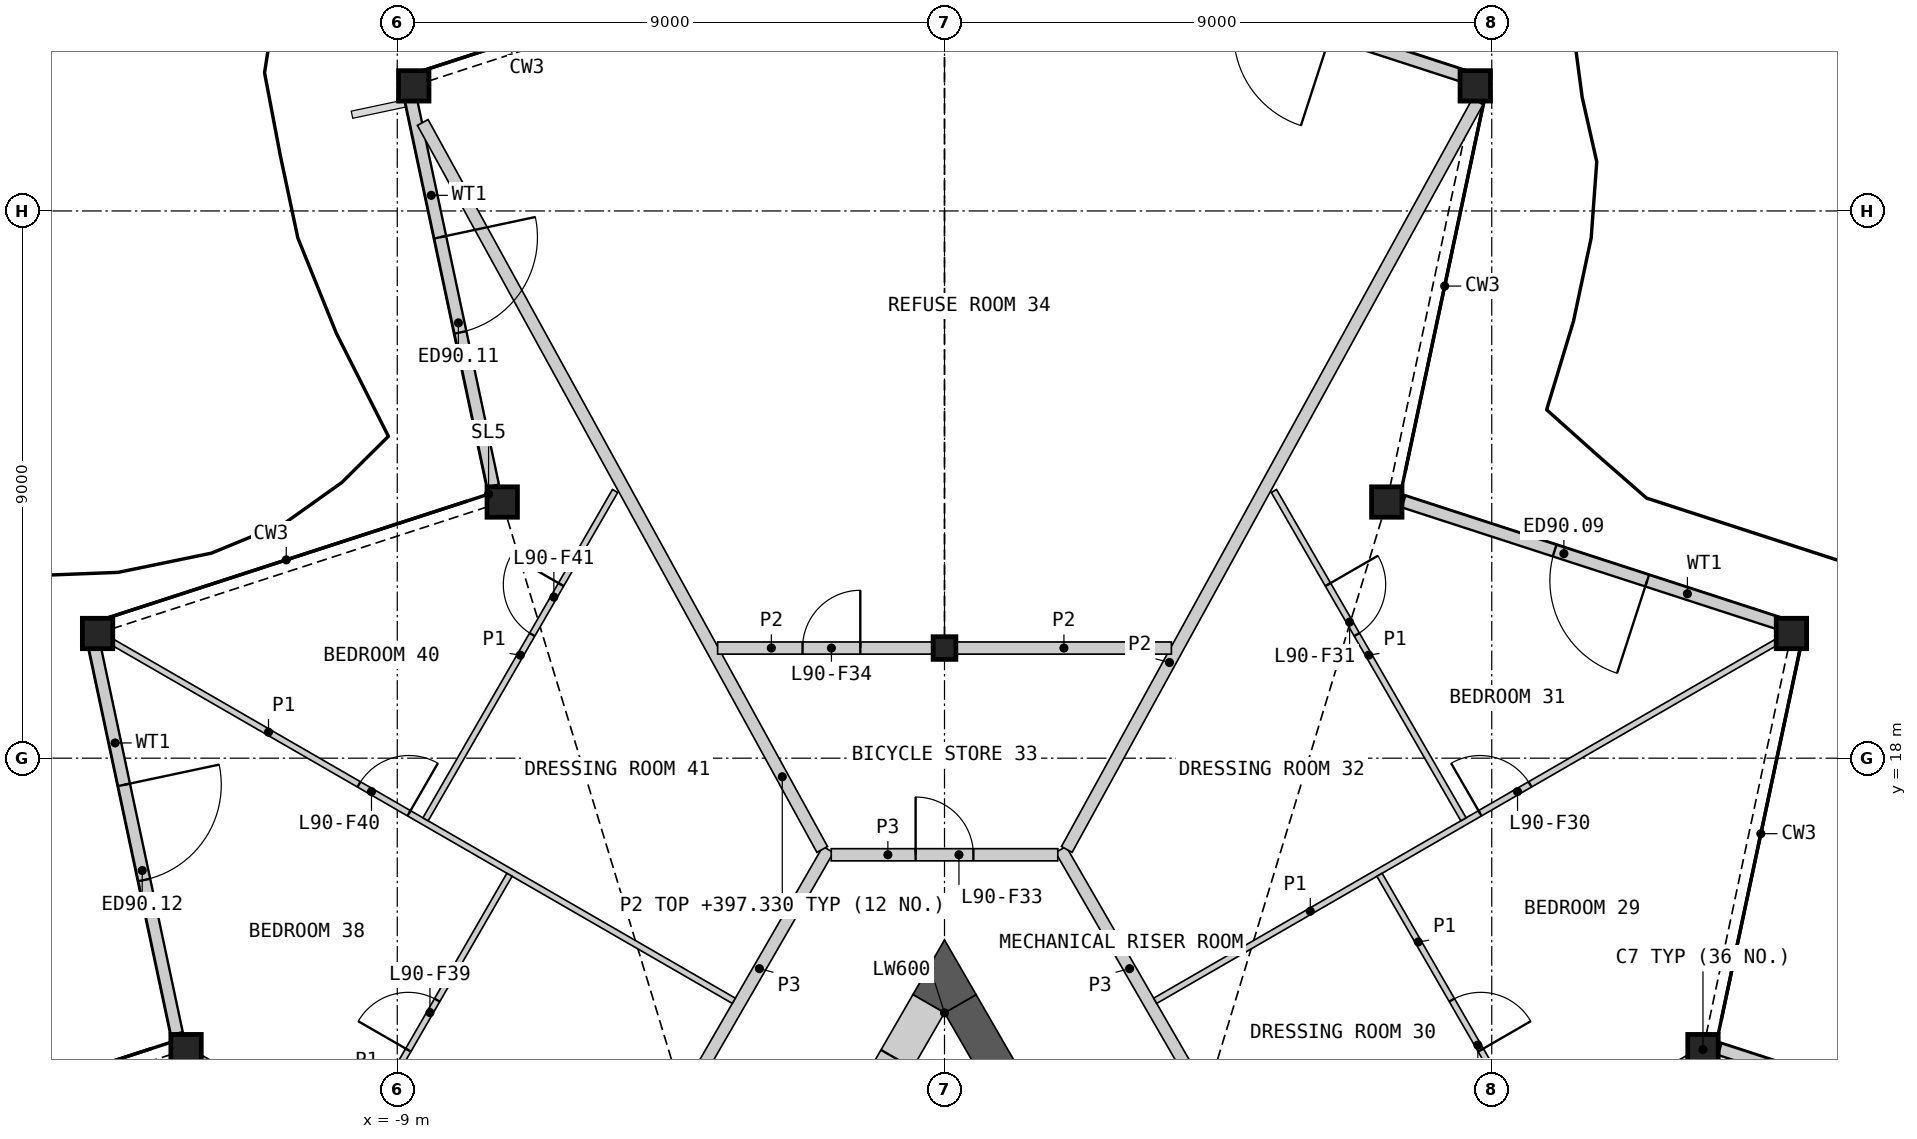
"""IFC4 building model, lengths in metres.
Left out: names, types, materials, properties, quantities, classifications, styles, units other than length and angle.
Written with IfcOpenShell. Run it as: python <this file> out.ifc"""

import sys

from ifc_helpers import new_model, si_unit, direction, frame, frame_2d, origin, origin_2d, place, context, subcontext, project, spatial, polyline, rectangle, hollow_rectangle, i_section, outline, extrude, element, fill, save


model = new_model("IFC4")
c1 = context("Model", 3, precision=1e-05, world=origin(), true_north=direction((0.0, 1.0)))
c2 = subcontext(c1, "Body", "Model", "MODEL_VIEW")
j1 = project(units=[si_unit("LENGTHUNIT", "METRE"), si_unit("PLANEANGLEUNIT", "RADIAN")], contexts=[c1])
p1 = place(None, origin())
s1 = spatial("IfcSite", under=j1, at=p1, CompositionType="ELEMENT")
p2 = place(p1, origin())
s2 = spatial("IfcBuilding", under=s1, at=p2, CompositionType="ELEMENT")
p3 = place(p2, frame((0.0, 0.0, 395.0)))
s3 = spatial("IfcBuildingStorey", under=s2, at=p3, CompositionType="ELEMENT", Elevation=395.0)
for number, where, z_axis, x_axis in (
    (1, (12.474, 13.206, 0.0), (0.0, 0.0, 1.0), (1.0, 0.0, 0.0)),
    (2, (13.929, 20.051, 0.0), (0.0, 0.0, 1.0), (1.0, 0.0, 0.0)),
    (3, (7.274, 22.213, 0.0), (0.0, 0.0, 1.0), (1.0, 0.0, 0.0)),
    (4, (8.729, 29.057, 0.0), (0.0, 0.0, 1.0), (1.0, 0.0, 0.0)),
    (5, (-8.729, 29.057, 0.0), (0.0, 0.0, 1.0), (1.0, 0.0, 0.0)),
    (6, (-7.274, 22.213, 0.0), (0.0, 0.0, 1.0), (1.0, 0.0, 0.0)),
    (7, (-13.929, 20.051, 0.0), (0.0, 0.0, 1.0), (1.0, 0.0, 0.0)),
    (8, (-12.474, 13.206, 0.0), (0.0, 0.0, 1.0), (1.0, 0.0, 0.0)),
):
    element("IfcColumn", number, at=place(p3, frame(where, z_axis=z_axis, x_axis=x_axis)), inside=s3, PredefinedType="COLUMN", context=c2, shape_type="SweptSolid", body=[
        extrude(hollow_rectangle(XDim=0.5, YDim=0.5, WallThickness=0.03, at=origin_2d()), origin(), (0.0, 0.0, 1.0), 3.4),
    ])
p4 = place(p3, frame((0.0, 19.811, 0.0), z_axis=(0.0, 0.0, 1.0), x_axis=(1.0, 0.0, 0.0)))
e9 = element("IfcColumn", 9, at=p4, inside=s3, PredefinedType="COLUMN", context=c2, shape_type="SweptSolid", body=[
    extrude(i_section(OverallWidth=0.374, OverallDepth=0.372, WebThickness=0.016, FlangeThickness=0.026, at=origin_2d()), origin(), (0.0, 0.0, 1.0), 3.4),
])
p5 = place(p3, frame((18.974, 11.191, 0.0), z_axis=(0.0, 0.0, 1.0), x_axis=(-0.951057912068, 0.309012698595, 0.0)))
e10 = element("IfcWall", 10, at=p5, inside=s3, PredefinedType="SOLIDWALL", context=c2, shape_type="SweptSolid", body=[
    extrude(rectangle(XDim=6.546, YDim=0.2, at=frame_2d((3.273, 0.0))), origin(), (0.0, 0.0, 1.0), 2.634),
])
p6 = place(p5, frame((2.333, 0.0, 0.0)))
e11 = element("IfcOpeningElement", 11, at=p6, cuts=e10, PredefinedType="OPENING", context=c2, shape_type="SweptSolid", body=[
    extrude(rectangle(XDim=1.6, YDim=2.25, at=frame_2d((0.8, 1.125))), frame((0.0, 0.11, 0.0), z_axis=(0.0, -1.0, 0.0), x_axis=(1.0, 0.0, 0.0)), (0.0, 0.0, 1.0), 0.22),
])
p7 = place(p3, frame((13.774, 20.198, 0.0), z_axis=(0.0, 0.0, 1.0), x_axis=(-0.951046950169, 0.309046434335, 0.0)))
e12 = element("IfcWall", 12, at=p7, inside=s3, PredefinedType="SOLIDWALL", context=c2, shape_type="SweptSolid", body=[
    extrude(rectangle(XDim=6.546, YDim=0.2, at=frame_2d((3.273, 0.0))), origin(), (0.0, 0.0, 1.0), 2.634),
])
p8 = place(p7, frame((2.333, 0.0, 0.0)))
e13 = element("IfcOpeningElement", 13, at=p8, cuts=e12, PredefinedType="OPENING", context=c2, shape_type="SweptSolid", body=[
    extrude(rectangle(XDim=1.6, YDim=2.25, at=frame_2d((0.8, 1.125))), frame((0.0, 0.11, 0.0), z_axis=(0.0, -1.0, 0.0), x_axis=(1.0, 0.0, 0.0)), (0.0, 0.0, 1.0), 0.22),
])
p9 = place(p3, frame((8.574, 29.205, 0.0), z_axis=(0.0, 0.0, 1.0), x_axis=(-0.951057912068, 0.309012698595, 0.0)))
e14 = element("IfcWall", 14, at=p9, inside=s3, PredefinedType="SOLIDWALL", context=c2, shape_type="SweptSolid", body=[
    extrude(rectangle(XDim=6.546, YDim=0.2, at=frame_2d((3.273, 0.0))), origin(), (0.0, 0.0, 1.0), 2.634),
])
p10 = place(p9, frame((2.333, 0.0, 0.0)))
e15 = element("IfcOpeningElement", 15, at=p10, cuts=e14, PredefinedType="OPENING", context=c2, shape_type="SweptSolid", body=[
    extrude(rectangle(XDim=1.6, YDim=2.25, at=frame_2d((0.8, 1.125))), frame((0.0, 0.11, 0.0), z_axis=(0.0, -1.0, 0.0), x_axis=(1.0, 0.0, 0.0)), (0.0, 0.0, 1.0), 0.22),
])
p11 = place(p3, frame((-8.779, 28.85, 0.0), z_axis=(0.0, 0.0, 1.0), x_axis=(0.207910765171, -0.978147797486, 0.0)))
e16 = element("IfcWall", 16, at=p11, inside=s3, PredefinedType="SOLIDWALL", context=c2, shape_type="SweptSolid", body=[
    extrude(rectangle(XDim=6.512, YDim=0.2, at=frame_2d((3.256, 0.0))), origin(), (0.0, 0.0, 1.0), 2.634),
])
p12 = place(p11, frame((2.333, 0.0, 0.0)))
e17 = element("IfcOpeningElement", 17, at=p12, cuts=e16, PredefinedType="OPENING", context=c2, shape_type="SweptSolid", body=[
    extrude(rectangle(XDim=1.6, YDim=2.25, at=frame_2d((0.8, 1.125))), frame((0.0, 0.11, 0.0), z_axis=(0.0, -1.0, 0.0), x_axis=(1.0, 0.0, 0.0)), (0.0, 0.0, 1.0), 0.22),
])
p13 = place(p3, frame((-13.979, 19.843, 0.0), z_axis=(0.0, 0.0, 1.0), x_axis=(0.207910765171, -0.978147797486, 0.0)))
e18 = element("IfcWall", 18, at=p13, inside=s3, PredefinedType="SOLIDWALL", context=c2, shape_type="SweptSolid", body=[
    extrude(rectangle(XDim=6.512, YDim=0.2, at=frame_2d((3.256, 0.0))), origin(), (0.0, 0.0, 1.0), 2.634),
])
p14 = place(p13, frame((2.333, 0.0, 0.0)))
e19 = element("IfcOpeningElement", 19, at=p14, cuts=e18, PredefinedType="OPENING", context=c2, shape_type="SweptSolid", body=[
    extrude(rectangle(XDim=1.6, YDim=2.25, at=frame_2d((0.8, 1.125))), frame((0.0, 0.11, 0.0), z_axis=(0.0, -1.0, 0.0), x_axis=(1.0, 0.0, 0.0)), (0.0, 0.0, 1.0), 0.22),
])
p15 = place(p3, frame((2.361, 10.322, 0.0), z_axis=(0.0, 0.0, 1.0), x_axis=(-0.500000735859, 0.866024978935, 0.0)))
e20 = element("IfcWall", 20, at=p15, inside=s3, PredefinedType="SHEAR", context=c2, shape_type="SweptSolid", body=[
    extrude(rectangle(XDim=4.202, YDim=0.6, at=frame_2d((2.101, 0.0))), origin(), (0.0, 0.0, 1.0), 3.1),
])
p16 = place(p3, origin())
e21 = element("IfcWall", 21, at=p16, inside=s3, PredefinedType="SHEAR", context=c2, shape_type="SweptSolid", body=[
    extrude(outline(polyline([(0.0, 13.811), (-0.52, 14.111), (0.0, 15.011), (0.52, 14.111), (0.0, 13.811)])), origin(), (0.0, 0.0, 1.0), 3.1),
])
p17 = place(p3, frame((-0.26, 13.961, 0.0), z_axis=(0.0, 0.0, 1.0), x_axis=(-0.49997936161, -0.866037319036, 0.0)))
e22 = element("IfcWall", 22, at=p17, inside=s3, PredefinedType="SHEAR", context=c2, shape_type="SweptSolid", body=[
    extrude(rectangle(XDim=2.66, YDim=0.6, at=frame_2d((1.33, 0.0))), origin(), (0.0, 0.0, 1.0), 3.1),
])
p18 = place(p17, frame((1.05, 0.0, 0.0)))
e23 = element("IfcOpeningElement", 23, at=p18, cuts=e22, PredefinedType="OPENING", context=c2, shape_type="SweptSolid", body=[
    extrude(rectangle(XDim=1.0, YDim=2.1, at=frame_2d((0.5, 1.05))), frame((0.0, 0.31, 0.0), z_axis=(0.0, -1.0, 0.0), x_axis=(1.0, 0.0, 0.0)), (0.0, 0.0, 1.0), 0.62),
])
for number, where, z_axis, x_axis in (
    (24, (-4.176, 12.579, 0.0), (0.0, 0.0, 1.0), (0.5, 0.866, 0.0)),
    (25, (1.913, 16.498, 0.0), (0.0, 0.0, 1.0), (0.5, -0.866, 0.0)),
):
    element("IfcWall", number, at=place(p3, frame(where, z_axis=z_axis, x_axis=x_axis)), inside=s3, PredefinedType="PARTITIONING", context=c2, shape_type="SweptSolid", body=[
        extrude(rectangle(XDim=4.525, YDim=0.2, at=frame_2d((2.263, 0.0))), origin(), (0.0, 0.0, 1.0), 3.1),
    ])
p19 = place(p3, frame((-1.863, 16.411, 0.0), z_axis=(0.0, 0.0, 1.0), x_axis=(1.0, 0.0, 0.0)))
e26 = element("IfcWall", 26, at=p19, inside=s3, PredefinedType="PARTITIONING", context=c2, shape_type="SweptSolid", body=[
    extrude(rectangle(XDim=3.726, YDim=0.2, at=frame_2d((1.863, 0.0))), origin(), (0.0, 0.0, 1.0), 3.1),
])
p20 = place(p19, frame((1.388, 0.0, 0.0)))
e27 = element("IfcOpeningElement", 27, at=p20, cuts=e26, PredefinedType="OPENING", context=c2, shape_type="SweptSolid", body=[
    extrude(rectangle(XDim=0.95, YDim=2.1, at=frame_2d((0.475, 1.05))), frame((0.0, 0.11, 0.0), z_axis=(0.0, -1.0, 0.0), x_axis=(1.0, 0.0, 0.0)), (0.0, 0.0, 1.0), 0.22),
])
p21 = place(p3, frame((-8.581, 28.455, 0.0), z_axis=(0.0, 0.0, 1.0), x_axis=(0.481551865547, -0.876417594979, 0.0)))
e28 = element("IfcWall", 28, at=p21, inside=s3, PredefinedType="PARTITIONING", context=c2, shape_type="SweptSolid", body=[
    extrude(rectangle(XDim=13.643, YDim=0.2, at=frame_2d((6.821, 0.0))), origin(), (0.0, 0.0, 1.0), 2.33),
])
p22 = place(p3, frame((2.011, 16.499, 0.0), z_axis=(0.0, 0.0, 1.0), x_axis=(0.481548701843, 0.876419333284, 0.0)))
e29 = element("IfcWall", 29, at=p22, inside=s3, PredefinedType="PARTITIONING", context=c2, shape_type="SweptSolid", body=[
    extrude(rectangle(XDim=14.032, YDim=0.2, at=frame_2d((7.016, 0.0))), origin(), (0.0, 0.0, 1.0), 2.33),
])
p23 = place(p3, frame((0.197, 19.811, 0.0), z_axis=(0.0, 0.0, 1.0), x_axis=(1.0, 0.0, 0.0)))
e30 = element("IfcWall", 30, at=p23, inside=s3, PredefinedType="PARTITIONING", context=c2, shape_type="SweptSolid", body=[
    extrude(rectangle(XDim=3.534, YDim=0.2, at=frame_2d((1.767, 0.0))), origin(), (0.0, 0.0, 1.0), 2.33),
])
p24 = place(p3, frame((-3.731, 19.811, 0.0), z_axis=(0.0, 0.0, 1.0), x_axis=(1.0, 0.0, 0.0)))
e31 = element("IfcWall", 31, at=p24, inside=s3, PredefinedType="PARTITIONING", context=c2, shape_type="SweptSolid", body=[
    extrude(rectangle(XDim=3.534, YDim=0.2, at=frame_2d((1.767, 0.0))), origin(), (0.0, 0.0, 1.0), 2.33),
])
p25 = place(p24, frame((1.396, 0.0, 0.0)))
e32 = element("IfcOpeningElement", 32, at=p25, cuts=e31, PredefinedType="OPENING", context=c2, shape_type="SweptSolid", body=[
    extrude(rectangle(XDim=0.95, YDim=2.1, at=frame_2d((0.475, 1.05))), frame((0.0, 0.11, 0.0), z_axis=(0.0, -1.0, 0.0), x_axis=(1.0, 0.0, 0.0)), (0.0, 0.0, 1.0), 0.22),
])
p26 = place(p3, frame((-13.669, 19.9, 0.0), z_axis=(0.0, 0.0, 1.0), x_axis=(0.866032376801, -0.499987922186, 0.0)))
e33 = element("IfcWall", 33, at=p26, inside=s3, PredefinedType="PARTITIONING", context=c2, shape_type="SweptSolid", body=[
    extrude(rectangle(XDim=11.782, YDim=0.1, at=frame_2d((5.891, 0.0))), origin(), (0.0, 0.0, 1.0), 2.33),
])
p27 = place(p26, frame((4.664, 0.0, 0.0)))
e34 = element("IfcOpeningElement", 34, at=p27, cuts=e33, PredefinedType="OPENING", context=c2, shape_type="SweptSolid", body=[
    extrude(rectangle(XDim=0.95, YDim=2.1, at=frame_2d((0.475, 1.05))), frame((0.0, 0.06, 0.0), z_axis=(0.0, -1.0, 0.0), x_axis=(1.0, 0.0, 0.0)), (0.0, 0.0, 1.0), 0.12),
])
p28 = place(p3, frame((3.465, 14.01, 0.0), z_axis=(0.0, 0.0, 1.0), x_axis=(0.866032376801, 0.499987922186, 0.0)))
e35 = element("IfcWall", 35, at=p28, inside=s3, PredefinedType="PARTITIONING", context=c2, shape_type="SweptSolid", body=[
    extrude(rectangle(XDim=11.782, YDim=0.1, at=frame_2d((5.891, 0.0))), origin(), (0.0, 0.0, 1.0), 2.33),
])
p29 = place(p28, frame((6.168, 0.0, 0.0)))
e36 = element("IfcOpeningElement", 36, at=p29, cuts=e35, PredefinedType="OPENING", context=c2, shape_type="SweptSolid", body=[
    extrude(rectangle(XDim=0.95, YDim=2.1, at=frame_2d((0.475, 1.05))), frame((0.0, 0.06, 0.0), z_axis=(0.0, -1.0, 0.0), x_axis=(1.0, 0.0, 0.0)), (0.0, 0.0, 1.0), 0.12),
])
p30 = place(p3, frame((6.065, 9.506, 0.0), z_axis=(0.0, 0.0, 1.0), x_axis=(0.866018949465, 0.500011179042, 0.0)))
e37 = element("IfcWall", 37, at=p30, inside=s3, PredefinedType="PARTITIONING", context=c2, shape_type="SweptSolid", body=[
    extrude(rectangle(XDim=7.1, YDim=0.1, at=frame_2d((3.55, 0.0))), origin(), (0.0, 0.0, 1.0), 2.33),
])
p31 = place(p30, frame((4.488, 0.0, 0.0)))
e38 = element("IfcOpeningElement", 38, at=p31, cuts=e37, PredefinedType="OPENING", context=c2, shape_type="SweptSolid", body=[
    extrude(rectangle(XDim=0.95, YDim=2.1, at=frame_2d((0.475, 1.05))), frame((0.0, 0.06, 0.0), z_axis=(0.0, -1.0, 0.0), x_axis=(1.0, 0.0, 0.0)), (0.0, 0.0, 1.0), 0.12),
])
p32 = place(p3, frame((-12.214, 13.056, 0.0), z_axis=(0.0, 0.0, 1.0), x_axis=(0.866018949465, -0.500011179042, 0.0)))
e39 = element("IfcWall", 39, at=p32, inside=s3, PredefinedType="PARTITIONING", context=c2, shape_type="SweptSolid", body=[
    extrude(rectangle(XDim=7.1, YDim=0.1, at=frame_2d((3.55, 0.0))), origin(), (0.0, 0.0, 1.0), 2.33),
])
p33 = place(p32, frame((1.663, 0.0, 0.0)))
e40 = element("IfcOpeningElement", 40, at=p33, cuts=e39, PredefinedType="OPENING", context=c2, shape_type="SweptSolid", body=[
    extrude(rectangle(XDim=0.95, YDim=2.1, at=frame_2d((0.475, 1.05))), frame((0.0, 0.06, 0.0), z_axis=(0.0, -1.0, 0.0), x_axis=(1.0, 0.0, 0.0)), (0.0, 0.0, 1.0), 0.12),
])
p34 = place(p3, frame((5.417, 22.394, 0.0), z_axis=(0.0, 0.0, 1.0), x_axis=(0.499975529996, -0.866039531087, 0.0)))
e41 = element("IfcWall", 41, at=p34, inside=s3, PredefinedType="PARTITIONING", context=c2, shape_type="SweptSolid", body=[
    extrude(rectangle(XDim=6.235, YDim=0.1, at=frame_2d((3.118, 0.0))), origin(), (0.0, 0.0, 1.0), 2.33),
])
p35 = place(p34, frame((1.777, 0.0, 0.0)))
e42 = element("IfcOpeningElement", 42, at=p35, cuts=e41, PredefinedType="OPENING", context=c2, shape_type="SweptSolid", body=[
    extrude(rectangle(XDim=0.95, YDim=2.1, at=frame_2d((0.475, 1.05))), frame((0.0, 0.06, 0.0), z_axis=(0.0, -1.0, 0.0), x_axis=(1.0, 0.0, 0.0)), (0.0, 0.0, 1.0), 0.12),
])
p36 = place(p3, frame((-8.535, 16.994, 0.0), z_axis=(0.0, 0.0, 1.0), x_axis=(0.499975529996, 0.866039531087, 0.0)))
e43 = element("IfcWall", 43, at=p36, inside=s3, PredefinedType="PARTITIONING", context=c2, shape_type="SweptSolid", body=[
    extrude(rectangle(XDim=6.235, YDim=0.1, at=frame_2d((3.118, 0.0))), origin(), (0.0, 0.0, 1.0), 2.33),
])
p37 = place(p36, frame((3.508, 0.0, 0.0)))
e44 = element("IfcOpeningElement", 44, at=p37, cuts=e43, PredefinedType="OPENING", context=c2, shape_type="SweptSolid", body=[
    extrude(rectangle(XDim=0.95, YDim=2.1, at=frame_2d((0.475, 1.05))), frame((0.0, 0.06, 0.0), z_axis=(0.0, -1.0, 0.0), x_axis=(1.0, 0.0, 0.0)), (0.0, 0.0, 1.0), 0.12),
])
p38 = place(p3, frame((7.154, 16.082, 0.0), z_axis=(0.0, 0.0, 1.0), x_axis=(0.499984882974, -0.866034131428, 0.0)))
e45 = element("IfcWall", 45, at=p38, inside=s3, PredefinedType="PARTITIONING", context=c2, shape_type="SweptSolid", body=[
    extrude(rectangle(XDim=5.1, YDim=0.1, at=frame_2d((2.55, 0.0))), origin(), (0.0, 0.0, 1.0), 2.33),
])
p39 = place(p38, frame((2.379, 0.0, 0.0)))
e46 = element("IfcOpeningElement", 46, at=p39, cuts=e45, PredefinedType="OPENING", context=c2, shape_type="SweptSolid", body=[
    extrude(rectangle(XDim=0.95, YDim=2.1, at=frame_2d((0.475, 1.05))), frame((0.0, 0.06, 0.0), z_axis=(0.0, -1.0, 0.0), x_axis=(1.0, 0.0, 0.0)), (0.0, 0.0, 1.0), 0.12),
])
p40 = place(p3, frame((-9.704, 11.665, 0.0), z_axis=(0.0, 0.0, 1.0), x_axis=(0.499984882974, 0.866034131428, 0.0)))
e47 = element("IfcWall", 47, at=p40, inside=s3, PredefinedType="PARTITIONING", context=c2, shape_type="SweptSolid", body=[
    extrude(rectangle(XDim=5.1, YDim=0.1, at=frame_2d((2.55, 0.0))), origin(), (0.0, 0.0, 1.0), 2.33),
])
p41 = place(p40, frame((1.771, 0.0, 0.0)))
e48 = element("IfcOpeningElement", 48, at=p41, cuts=e47, PredefinedType="OPENING", context=c2, shape_type="SweptSolid", body=[
    extrude(rectangle(XDim=0.95, YDim=2.1, at=frame_2d((0.475, 1.05))), frame((0.0, 0.06, 0.0), z_axis=(0.0, -1.0, 0.0), x_axis=(1.0, 0.0, 0.0)), (0.0, 0.0, 1.0), 0.12),
])
p42 = place(p8, origin())
e49 = element("IfcDoor", 49, at=p42, inside=s3, OperationType="DOUBLE_DOOR_SINGLE_SWING", PredefinedType="DOOR", context=c2, shape_type="SweptSolid", body=[
    extrude(rectangle(XDim=1.6, YDim=2.25, at=frame_2d((0.8, 1.125))), frame((0.0, 0.025, 0.0), z_axis=(0.0, -1.0, 0.0), x_axis=(1.0, 0.0, 0.0)), (0.0, 0.0, 1.0), 0.05),
])
fill(e13, e49)
p43 = place(p12, origin())
e50 = element("IfcDoor", 50, at=p43, inside=s3, OperationType="DOUBLE_DOOR_SINGLE_SWING", PredefinedType="DOOR", context=c2, shape_type="SweptSolid", body=[
    extrude(rectangle(XDim=1.6, YDim=2.25, at=frame_2d((0.8, 1.125))), frame((0.0, 0.025, 0.0), z_axis=(0.0, -1.0, 0.0), x_axis=(1.0, 0.0, 0.0)), (0.0, 0.0, 1.0), 0.05),
])
fill(e17, e50)
p44 = place(p14, origin())
e51 = element("IfcDoor", 51, at=p44, inside=s3, OperationType="DOUBLE_DOOR_SINGLE_SWING", PredefinedType="DOOR", context=c2, shape_type="SweptSolid", body=[
    extrude(rectangle(XDim=1.6, YDim=2.25, at=frame_2d((0.8, 1.125))), frame((0.0, 0.025, 0.0), z_axis=(0.0, -1.0, 0.0), x_axis=(1.0, 0.0, 0.0)), (0.0, 0.0, 1.0), 0.05),
])
fill(e19, e51)
p45 = place(p39, origin())
e52 = element("IfcDoor", 52, at=p45, inside=s3, OperationType="SINGLE_SWING_RIGHT", PredefinedType="DOOR", context=c2, shape_type="SweptSolid", body=[
    extrude(rectangle(XDim=0.95, YDim=2.1, at=frame_2d((0.475, 1.05))), frame((0.0, 0.025, 0.0), z_axis=(0.0, -1.0, 0.0), x_axis=(1.0, 0.0, 0.0)), (0.0, 0.0, 1.0), 0.05),
])
fill(e46, e52)
p46 = place(p29, origin())
e53 = element("IfcDoor", 53, at=p46, inside=s3, OperationType="SINGLE_SWING_LEFT", PredefinedType="DOOR", context=c2, shape_type="SweptSolid", body=[
    extrude(rectangle(XDim=0.95, YDim=2.1, at=frame_2d((0.475, 1.05))), frame((0.0, 0.025, 0.0), z_axis=(0.0, -1.0, 0.0), x_axis=(1.0, 0.0, 0.0)), (0.0, 0.0, 1.0), 0.05),
])
fill(e36, e53)
p47 = place(p35, origin())
e54 = element("IfcDoor", 54, at=p47, inside=s3, OperationType="SINGLE_SWING_LEFT", PredefinedType="DOOR", context=c2, shape_type="SweptSolid", body=[
    extrude(rectangle(XDim=0.95, YDim=2.1, at=frame_2d((0.475, 1.05))), frame((0.0, 0.025, 0.0), z_axis=(0.0, -1.0, 0.0), x_axis=(1.0, 0.0, 0.0)), (0.0, 0.0, 1.0), 0.05),
])
fill(e42, e54)
p48 = place(p20, origin())
e55 = element("IfcDoor", 55, at=p48, inside=s3, OperationType="SINGLE_SWING_LEFT", PredefinedType="DOOR", context=c2, shape_type="SweptSolid", body=[
    extrude(rectangle(XDim=0.95, YDim=2.1, at=frame_2d((0.475, 1.05))), frame((0.0, 0.025, 0.0), z_axis=(0.0, -1.0, 0.0), x_axis=(1.0, 0.0, 0.0)), (0.0, 0.0, 1.0), 0.05),
])
fill(e27, e55)
p49 = place(p25, origin())
e56 = element("IfcDoor", 56, at=p49, inside=s3, OperationType="SINGLE_SWING_RIGHT", PredefinedType="DOOR", context=c2, shape_type="SweptSolid", body=[
    extrude(rectangle(XDim=0.95, YDim=2.1, at=frame_2d((0.475, 1.05))), frame((0.0, 0.025, 0.0), z_axis=(0.0, -1.0, 0.0), x_axis=(1.0, 0.0, 0.0)), (0.0, 0.0, 1.0), 0.05),
])
fill(e32, e56)
p50 = place(p41, origin())
e57 = element("IfcDoor", 57, at=p50, inside=s3, OperationType="SINGLE_SWING_LEFT", PredefinedType="DOOR", context=c2, shape_type="SweptSolid", body=[
    extrude(rectangle(XDim=0.95, YDim=2.1, at=frame_2d((0.475, 1.05))), frame((0.0, 0.025, 0.0), z_axis=(0.0, -1.0, 0.0), x_axis=(1.0, 0.0, 0.0)), (0.0, 0.0, 1.0), 0.05),
])
fill(e48, e57)
p51 = place(p27, origin())
e58 = element("IfcDoor", 58, at=p51, inside=s3, OperationType="SINGLE_SWING_RIGHT", PredefinedType="DOOR", context=c2, shape_type="SweptSolid", body=[
    extrude(rectangle(XDim=0.95, YDim=2.1, at=frame_2d((0.475, 1.05))), frame((0.0, 0.025, 0.0), z_axis=(0.0, -1.0, 0.0), x_axis=(1.0, 0.0, 0.0)), (0.0, 0.0, 1.0), 0.05),
])
fill(e34, e58)
p52 = place(p37, origin())
e59 = element("IfcDoor", 59, at=p52, inside=s3, OperationType="SINGLE_SWING_RIGHT", PredefinedType="DOOR", context=c2, shape_type="SweptSolid", body=[
    extrude(rectangle(XDim=0.95, YDim=2.1, at=frame_2d((0.475, 1.05))), frame((0.0, 0.025, 0.0), z_axis=(0.0, -1.0, 0.0), x_axis=(1.0, 0.0, 0.0)), (0.0, 0.0, 1.0), 0.05),
])
fill(e44, e59)
save(model, sys.argv[1])
